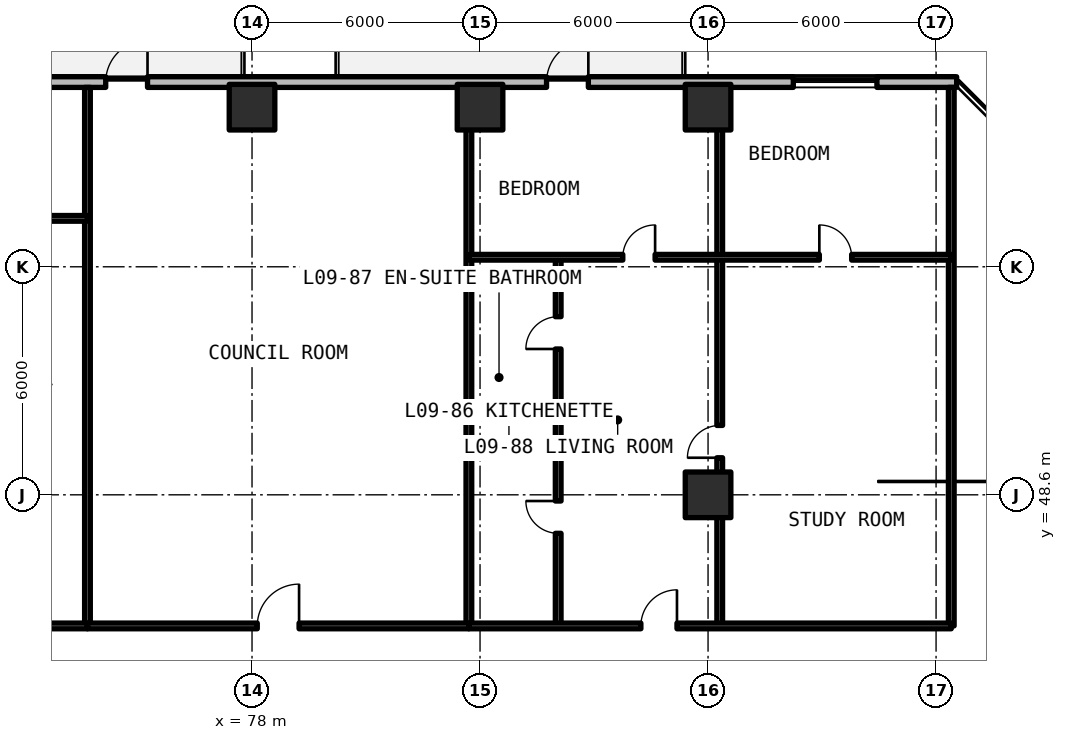
"""IFC4 building model, lengths in metres.
Left out: names, types, materials, properties, quantities, classifications, styles, units other than length and angle.
Written with IfcOpenShell. Run it as: python <this file> out.ifc"""

import sys

from ifc_helpers import new_model, si_unit, direction, frame, frame_2d, origin, origin_2d, place, context, subcontext, project, spatial, rectangle, extrude, element, fill, save


model = new_model("IFC4")
c1 = context("Model", 3, precision=1e-05, world=origin(), true_north=direction((0.0, 1.0)))
c2 = subcontext(c1, "Body", "Model", "MODEL_VIEW")
j1 = project(units=[si_unit("LENGTHUNIT", "METRE"), si_unit("PLANEANGLEUNIT", "RADIAN")], contexts=[c1])
p1 = place(None, origin())
s1 = spatial("IfcSite", under=j1, at=p1, CompositionType="ELEMENT")
p2 = place(p1, origin())
s2 = spatial("IfcBuilding", under=s1, at=p2, CompositionType="ELEMENT")
p3 = place(p2, frame((0.0, 0.0, 35.64)))
s3 = spatial("IfcBuildingStorey", under=s2, at=p3, CompositionType="ELEMENT", Elevation=35.64)
for number, where, z_axis, x_axis in (
    (1, (90.0, 48.6, 0.0), (0.0, 0.0, 1.0), (1.0, 0.0, 0.0)),
    (2, (78.0, 58.8, 0.0), (0.0, 0.0, 1.0), (1.0, 0.0, 0.0)),
    (3, (84.0, 58.8, 0.0), (0.0, 0.0, 1.0), (1.0, 0.0, 0.0)),
    (4, (90.0, 58.8, 0.0), (0.0, 0.0, 1.0), (1.0, 0.0, 0.0)),
):
    element("IfcColumn", number, at=place(p3, frame(where, z_axis=z_axis, x_axis=x_axis)), inside=s3, PredefinedType="COLUMN", context=c2, shape_type="SweptSolid", body=[
        extrude(rectangle(XDim=1.2, YDim=1.2, at=origin_2d()), origin(), (0.0, 0.0, 1.0), 3.3),
    ])
p4 = place(p3, frame((96.542, 59.46, 0.0), z_axis=(0.0, 0.0, 1.0), x_axis=(-1.0, 0.0, 0.0)))
e5 = element("IfcWall", 5, at=p4, inside=s3, PredefinedType="SOLIDWALL", context=c2, shape_type="SweptSolid", body=[
    extrude(rectangle(XDim=44.402, YDim=0.28, at=frame_2d((22.201, 0.0))), origin(), (0.0, 0.0, 1.0), 3.08),
])
p5 = place(p4, frame((33.642, 0.0, 0.0)))
e6 = element("IfcOpeningElement", 6, at=p5, cuts=e5, PredefinedType="OPENING", context=c2, shape_type="SweptSolid", body=[
    extrude(rectangle(XDim=1.1, YDim=2.15, at=frame_2d((0.55, 1.075))), frame((0.0, 0.15, 0.0), z_axis=(0.0, -1.0, 0.0), x_axis=(1.0, 0.0, 0.0)), (0.0, 0.0, 1.0), 0.3),
])
p6 = place(p4, frame((21.292, 0.0, 0.0)))
e7 = element("IfcOpeningElement", 7, at=p6, cuts=e5, PredefinedType="OPENING", context=c2, shape_type="SweptSolid", body=[
    extrude(rectangle(XDim=1.1, YDim=2.15, at=frame_2d((0.55, 1.075))), frame((0.0, 0.15, 0.0), z_axis=(0.0, -1.0, 0.0), x_axis=(1.0, 0.0, 0.0)), (0.0, 0.0, 1.0), 0.3),
])
p7 = place(p4, frame((9.692, 0.0, 0.0)))
e8 = element("IfcOpeningElement", 8, at=p7, cuts=e5, PredefinedType="OPENING", context=c2, shape_type="SweptSolid", body=[
    extrude(rectangle(XDim=1.1, YDim=2.15, at=frame_2d((0.55, 1.075))), frame((0.0, 0.15, 0.0), z_axis=(0.0, -1.0, 0.0), x_axis=(1.0, 0.0, 0.0)), (0.0, 0.0, 1.0), 0.3),
])
p8 = place(p4, frame((39.455, 0.0, 0.78)))
e9 = element("IfcOpeningElement", 9, at=p8, cuts=e5, PredefinedType="OPENING", context=c2, shape_type="SweptSolid", body=[
    extrude(rectangle(XDim=2.2, YDim=1.66, at=frame_2d((1.1, 0.83))), frame((0.0, 0.15, 0.0), z_axis=(0.0, -1.0, 0.0), x_axis=(1.0, 0.0, 0.0)), (0.0, 0.0, 1.0), 0.3),
])
p9 = place(p4, frame((26.053, 0.0, 0.78)))
e10 = element("IfcOpeningElement", 10, at=p9, cuts=e5, PredefinedType="OPENING", context=c2, shape_type="SweptSolid", body=[
    extrude(rectangle(XDim=2.2, YDim=1.66, at=frame_2d((1.1, 0.83))), frame((0.0, 0.15, 0.0), z_axis=(0.0, -1.0, 0.0), x_axis=(1.0, 0.0, 0.0)), (0.0, 0.0, 1.0), 0.3),
])
p10 = place(p4, frame((2.098, 0.0, 0.78)))
e11 = element("IfcOpeningElement", 11, at=p10, cuts=e5, PredefinedType="OPENING", context=c2, shape_type="SweptSolid", body=[
    extrude(rectangle(XDim=2.2, YDim=1.66, at=frame_2d((1.1, 0.83))), frame((0.0, 0.15, 0.0), z_axis=(0.0, -1.0, 0.0), x_axis=(1.0, 0.0, 0.0)), (0.0, 0.0, 1.0), 0.3),
])
for number, where, z_axis, x_axis in (
    (12, (96.4, 45.15, 0.0), (0.0, 0.0, 1.0), (0.0, 1.0, 0.0)),
    (13, (73.67, 45.15, 0.0), (0.0, 0.0, 1.0), (0.0, 1.0, 0.0)),
):
    element("IfcWall", number, at=place(p3, frame(where, z_axis=z_axis, x_axis=x_axis)), inside=s3, PredefinedType="SOLIDWALL", context=c2, shape_type="SweptSolid", body=[
        extrude(rectangle(XDim=14.17, YDim=0.15, at=frame_2d((7.085, 0.0))), origin(), (0.0, 0.0, 1.0), 2.35),
    ])
p11 = place(p3, frame((65.109, 55.874, 0.0), z_axis=(0.0, 0.0, 1.0), x_axis=(1.0, 0.0, 0.0)))
e14 = element("IfcWall", 14, at=p11, inside=s3, PredefinedType="PARTITIONING", context=c2, shape_type="SweptSolid", body=[
    extrude(rectangle(XDim=8.561, YDim=0.15, at=frame_2d((4.28, 0.0))), origin(), (0.0, 0.0, 1.0), 2.35),
])
p12 = place(p11, frame((5.301, 0.0, 0.0)))
e15 = element("IfcOpeningElement", 15, at=p12, cuts=e14, PredefinedType="OPENING", context=c2, shape_type="SweptSolid", body=[
    extrude(rectangle(XDim=0.85, YDim=2.1, at=frame_2d((0.425, 1.05))), frame((0.0, 0.085, 0.0), z_axis=(0.0, -1.0, 0.0), x_axis=(1.0, 0.0, 0.0)), (0.0, 0.0, 1.0), 0.17),
])
p13 = place(p3, frame((65.109, 45.15, 0.0), z_axis=(0.0, 0.0, 1.0), x_axis=(1.0, 0.0, 0.0)))
e16 = element("IfcWall", 16, at=p13, inside=s3, PredefinedType="SOLIDWALL", context=c2, shape_type="SweptSolid", body=[
    extrude(rectangle(XDim=8.561, YDim=0.15, at=frame_2d((4.28, 0.0))), origin(), (0.0, 0.0, 1.0), 2.35),
])
p14 = place(p13, frame((5.251, 0.0, 0.0)))
e17 = element("IfcOpeningElement", 17, at=p14, cuts=e16, PredefinedType="OPENING", context=c2, shape_type="SweptSolid", body=[
    extrude(rectangle(XDim=0.95, YDim=2.15, at=frame_2d((0.475, 1.075))), frame((0.0, 0.085, 0.0), z_axis=(0.0, -1.0, 0.0), x_axis=(1.0, 0.0, 0.0)), (0.0, 0.0, 1.0), 0.17),
])
p15 = place(p3, frame((83.706, 45.15, 0.0), z_axis=(0.0, 0.0, 1.0), x_axis=(0.0, 1.0, 0.0)))
e18 = element("IfcWall", 18, at=p15, inside=s3, PredefinedType="SOLIDWALL", context=c2, shape_type="SweptSolid", body=[
    extrude(rectangle(XDim=14.17, YDim=0.15, at=frame_2d((7.085, 0.0))), origin(), (0.0, 0.0, 1.0), 2.35),
])
p16 = place(p3, frame((73.67, 45.15, 0.0), z_axis=(0.0, 0.0, 1.0), x_axis=(1.0, 0.0, 0.0)))
e19 = element("IfcWall", 19, at=p16, inside=s3, PredefinedType="SOLIDWALL", context=c2, shape_type="SweptSolid", body=[
    extrude(rectangle(XDim=10.037, YDim=0.15, at=frame_2d((5.018, 0.0))), origin(), (0.0, 0.0, 1.0), 2.35),
])
p17 = place(p16, frame((4.469, 0.0, 0.0)))
e20 = element("IfcOpeningElement", 20, at=p17, cuts=e19, PredefinedType="OPENING", context=c2, shape_type="SweptSolid", body=[
    extrude(rectangle(XDim=1.1, YDim=2.15, at=frame_2d((0.55, 1.075))), frame((0.0, 0.085, 0.0), z_axis=(0.0, -1.0, 0.0), x_axis=(1.0, 0.0, 0.0)), (0.0, 0.0, 1.0), 0.17),
])
p18 = place(p3, frame((90.307, 45.15, 0.0), z_axis=(0.0, 0.0, 1.0), x_axis=(0.0, 1.0, 0.0)))
e21 = element("IfcWall", 21, at=p18, inside=s3, PredefinedType="PARTITIONING", context=c2, shape_type="SweptSolid", body=[
    extrude(rectangle(XDim=9.701, YDim=0.15, at=frame_2d((4.851, 0.0))), origin(), (0.0, 0.0, 1.0), 2.35),
])
p19 = place(p18, frame((4.425, 0.0, 0.0)))
e22 = element("IfcOpeningElement", 22, at=p19, cuts=e21, PredefinedType="OPENING", context=c2, shape_type="SweptSolid", body=[
    extrude(rectangle(XDim=0.85, YDim=2.1, at=frame_2d((0.425, 1.05))), frame((0.0, 0.085, 0.0), z_axis=(0.0, -1.0, 0.0), x_axis=(1.0, 0.0, 0.0)), (0.0, 0.0, 1.0), 0.17),
])
p20 = place(p3, frame((83.706, 50.874, 0.0), z_axis=(0.0, 0.0, 1.0), x_axis=(1.0, 0.0, 0.0)))
e23 = element("IfcWall", 23, at=p20, inside=s3, PredefinedType="PARTITIONING", context=c2, shape_type="SweptSolid", body=[
    extrude(rectangle(XDim=2.35, YDim=0.15, at=frame_2d((1.175, 0.0))), origin(), (0.0, 0.0, 1.0), 2.35),
])
p21 = place(p3, frame((86.056, 45.15, 0.0), z_axis=(0.0, 0.0, 1.0), x_axis=(0.0, 1.0, 0.0)))
e24 = element("IfcWall", 24, at=p21, inside=s3, PredefinedType="PARTITIONING", context=c2, shape_type="SweptSolid", body=[
    extrude(rectangle(XDim=9.701, YDim=0.15, at=frame_2d((4.851, 0.0))), origin(), (0.0, 0.0, 1.0), 2.35),
])
p22 = place(p21, frame((2.437, 0.0, 0.0)))
e25 = element("IfcOpeningElement", 25, at=p22, cuts=e24, PredefinedType="OPENING", context=c2, shape_type="SweptSolid", body=[
    extrude(rectangle(XDim=0.85, YDim=2.1, at=frame_2d((0.425, 1.05))), frame((0.0, 0.085, 0.0), z_axis=(0.0, -1.0, 0.0), x_axis=(1.0, 0.0, 0.0)), (0.0, 0.0, 1.0), 0.17),
])
p23 = place(p21, frame((7.287, 0.0, 0.0)))
e26 = element("IfcOpeningElement", 26, at=p23, cuts=e24, PredefinedType="OPENING", context=c2, shape_type="SweptSolid", body=[
    extrude(rectangle(XDim=0.85, YDim=2.1, at=frame_2d((0.425, 1.05))), frame((0.0, 0.085, 0.0), z_axis=(0.0, -1.0, 0.0), x_axis=(1.0, 0.0, 0.0)), (0.0, 0.0, 1.0), 0.17),
])
p24 = place(p3, frame((90.307, 54.851, 0.0), z_axis=(0.0, 0.0, 1.0), x_axis=(0.0, 1.0, 0.0)))
e27 = element("IfcWall", 27, at=p24, inside=s3, PredefinedType="PARTITIONING", context=c2, shape_type="SweptSolid", body=[
    extrude(rectangle(XDim=4.469, YDim=0.15, at=frame_2d((2.235, 0.0))), origin(), (0.0, 0.0, 1.0), 2.35),
])
p25 = place(p3, frame((83.706, 54.851, 0.0), z_axis=(0.0, 0.0, 1.0), x_axis=(1.0, 0.0, 0.0)))
e28 = element("IfcWall", 28, at=p25, inside=s3, PredefinedType="PARTITIONING", context=c2, shape_type="SweptSolid", body=[
    extrude(rectangle(XDim=12.694, YDim=0.15, at=frame_2d((6.347, 0.0))), origin(), (0.0, 0.0, 1.0), 2.35),
])
p26 = place(p25, frame((4.05, 0.0, 0.0)))
e29 = element("IfcOpeningElement", 29, at=p26, cuts=e28, PredefinedType="OPENING", context=c2, shape_type="SweptSolid", body=[
    extrude(rectangle(XDim=0.85, YDim=2.1, at=frame_2d((0.425, 1.05))), frame((0.0, 0.085, 0.0), z_axis=(0.0, -1.0, 0.0), x_axis=(1.0, 0.0, 0.0)), (0.0, 0.0, 1.0), 0.17),
])
p27 = place(p25, frame((9.222, 0.0, 0.0)))
e30 = element("IfcOpeningElement", 30, at=p27, cuts=e28, PredefinedType="OPENING", context=c2, shape_type="SweptSolid", body=[
    extrude(rectangle(XDim=0.85, YDim=2.1, at=frame_2d((0.425, 1.05))), frame((0.0, 0.085, 0.0), z_axis=(0.0, -1.0, 0.0), x_axis=(1.0, 0.0, 0.0)), (0.0, 0.0, 1.0), 0.17),
])
p28 = place(p3, frame((83.706, 45.15, 0.0), z_axis=(0.0, 0.0, 1.0), x_axis=(1.0, 0.0, 0.0)))
e31 = element("IfcWall", 31, at=p28, inside=s3, PredefinedType="SOLIDWALL", context=c2, shape_type="SweptSolid", body=[
    extrude(rectangle(XDim=12.694, YDim=0.15, at=frame_2d((6.347, 0.0))), origin(), (0.0, 0.0, 1.0), 2.35),
])
p29 = place(p28, frame((4.526, 0.0, 0.0)))
e32 = element("IfcOpeningElement", 32, at=p29, cuts=e31, PredefinedType="OPENING", context=c2, shape_type="SweptSolid", body=[
    extrude(rectangle(XDim=0.95, YDim=2.15, at=frame_2d((0.475, 1.075))), frame((0.0, 0.085, 0.0), z_axis=(0.0, -1.0, 0.0), x_axis=(1.0, 0.0, 0.0)), (0.0, 0.0, 1.0), 0.17),
])
p30 = place(p6, frame((1.1, 0.0, 0.0), z_axis=(0.0, 0.0, 1.0), x_axis=(-1.0, 0.0, 0.0)))
e33 = element("IfcDoor", 33, at=p30, inside=s3, OperationType="SINGLE_SWING_RIGHT", PredefinedType="DOOR", context=c2, shape_type="SweptSolid", body=[
    extrude(rectangle(XDim=1.1, YDim=2.15, at=frame_2d((0.55, 1.075))), frame((0.0, 0.025, 0.0), z_axis=(0.0, -1.0, 0.0), x_axis=(1.0, 0.0, 0.0)), (0.0, 0.0, 1.0), 0.05),
])
fill(e7, e33)
p31 = place(p7, frame((1.1, 0.0, 0.0), z_axis=(0.0, 0.0, 1.0), x_axis=(-1.0, 0.0, 0.0)))
e34 = element("IfcDoor", 34, at=p31, inside=s3, OperationType="SINGLE_SWING_LEFT", PredefinedType="DOOR", context=c2, shape_type="SweptSolid", body=[
    extrude(rectangle(XDim=1.1, YDim=2.15, at=frame_2d((0.55, 1.075))), frame((0.0, 0.025, 0.0), z_axis=(0.0, -1.0, 0.0), x_axis=(1.0, 0.0, 0.0)), (0.0, 0.0, 1.0), 0.05),
])
fill(e8, e34)
p32 = place(p10, origin())
e35 = element("IfcWindow", 35, at=p32, inside=s3, PartitioningType="SINGLE_PANEL", PredefinedType="WINDOW", context=c2, shape_type="SweptSolid", body=[
    extrude(rectangle(XDim=2.2, YDim=1.66, at=frame_2d((1.1, 0.83))), frame((0.0, 0.03, 0.0), z_axis=(0.0, -1.0, 0.0), x_axis=(1.0, 0.0, 0.0)), (0.0, 0.0, 1.0), 0.06),
])
fill(e11, e35)
p33 = place(p17, origin())
e36 = element("IfcDoor", 36, at=p33, inside=s3, OperationType="SINGLE_SWING_RIGHT", PredefinedType="DOOR", context=c2, shape_type="SweptSolid", body=[
    extrude(rectangle(XDim=1.1, YDim=2.15, at=frame_2d((0.55, 1.075))), frame((0.0, 0.025, 0.0), z_axis=(0.0, -1.0, 0.0), x_axis=(1.0, 0.0, 0.0)), (0.0, 0.0, 1.0), 0.05),
])
fill(e20, e36)
p34 = place(p19, origin())
e37 = element("IfcDoor", 37, at=p34, inside=s3, OperationType="SINGLE_SWING_LEFT", PredefinedType="DOOR", context=c2, shape_type="SweptSolid", body=[
    extrude(rectangle(XDim=0.85, YDim=2.1, at=frame_2d((0.425, 1.05))), frame((0.0, 0.025, 0.0), z_axis=(0.0, -1.0, 0.0), x_axis=(1.0, 0.0, 0.0)), (0.0, 0.0, 1.0), 0.05),
])
fill(e22, e37)
p35 = place(p22, origin())
e38 = element("IfcDoor", 38, at=p35, inside=s3, OperationType="SINGLE_SWING_RIGHT", PredefinedType="DOOR", context=c2, shape_type="SweptSolid", body=[
    extrude(rectangle(XDim=0.85, YDim=2.1, at=frame_2d((0.425, 1.05))), frame((0.0, 0.025, 0.0), z_axis=(0.0, -1.0, 0.0), x_axis=(1.0, 0.0, 0.0)), (0.0, 0.0, 1.0), 0.05),
])
fill(e25, e38)
p36 = place(p23, origin())
e39 = element("IfcDoor", 39, at=p36, inside=s3, OperationType="SINGLE_SWING_LEFT", PredefinedType="DOOR", context=c2, shape_type="SweptSolid", body=[
    extrude(rectangle(XDim=0.85, YDim=2.1, at=frame_2d((0.425, 1.05))), frame((0.0, 0.025, 0.0), z_axis=(0.0, -1.0, 0.0), x_axis=(1.0, 0.0, 0.0)), (0.0, 0.0, 1.0), 0.05),
])
fill(e26, e39)
p37 = place(p26, origin())
e40 = element("IfcDoor", 40, at=p37, inside=s3, OperationType="SINGLE_SWING_RIGHT", PredefinedType="DOOR", context=c2, shape_type="SweptSolid", body=[
    extrude(rectangle(XDim=0.85, YDim=2.1, at=frame_2d((0.425, 1.05))), frame((0.0, 0.025, 0.0), z_axis=(0.0, -1.0, 0.0), x_axis=(1.0, 0.0, 0.0)), (0.0, 0.0, 1.0), 0.05),
])
fill(e29, e40)
p38 = place(p27, origin())
e41 = element("IfcDoor", 41, at=p38, inside=s3, OperationType="SINGLE_SWING_LEFT", PredefinedType="DOOR", context=c2, shape_type="SweptSolid", body=[
    extrude(rectangle(XDim=0.85, YDim=2.1, at=frame_2d((0.425, 1.05))), frame((0.0, 0.025, 0.0), z_axis=(0.0, -1.0, 0.0), x_axis=(1.0, 0.0, 0.0)), (0.0, 0.0, 1.0), 0.05),
])
fill(e30, e41)
p39 = place(p29, origin())
e42 = element("IfcDoor", 42, at=p39, inside=s3, OperationType="SINGLE_SWING_RIGHT", PredefinedType="DOOR", context=c2, shape_type="SweptSolid", body=[
    extrude(rectangle(XDim=0.95, YDim=2.15, at=frame_2d((0.475, 1.075))), frame((0.0, 0.025, 0.0), z_axis=(0.0, -1.0, 0.0), x_axis=(1.0, 0.0, 0.0)), (0.0, 0.0, 1.0), 0.05),
])
fill(e32, e42)
save(model, sys.argv[1])
